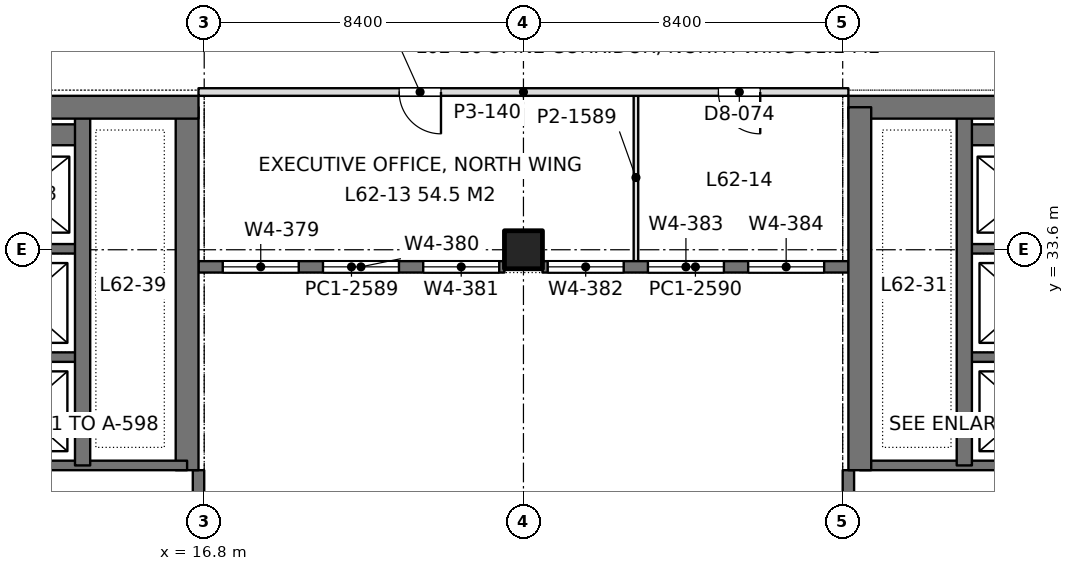
"""IFC4 building model, lengths in metres.
Left out: names, types, materials, properties, quantities, classifications, styles, units other than length and angle.
Written with IfcOpenShell. Run it as: python <this file> out.ifc"""

import sys

from ifc_helpers import new_model, si_unit, direction, frame, frame_2d, origin, origin_2d, place, context, subcontext, project, spatial, rectangle, extrude, element, fill, save


model = new_model("IFC4")
c1 = context("Model", 3, precision=1e-05, world=origin(), true_north=direction((0.0, 1.0)))
c2 = subcontext(c1, "Body", "Model", "MODEL_VIEW")
j1 = project(units=[si_unit("LENGTHUNIT", "METRE"), si_unit("PLANEANGLEUNIT", "RADIAN")], contexts=[c1])
p1 = place(None, origin())
s1 = spatial("IfcSite", under=j1, at=p1, CompositionType="ELEMENT")
p2 = place(p1, origin())
s2 = spatial("IfcBuilding", under=s1, at=p2, CompositionType="ELEMENT")
p3 = place(p2, frame((0.0, 0.0, 272.7)))
s3 = spatial("IfcBuildingStorey", under=s2, at=p3, CompositionType="ELEMENT", Elevation=272.7)
p4 = place(p3, frame((25.2, 33.6, 0.0), z_axis=(0.0, 0.0, 1.0), x_axis=(1.0, 0.0, 0.0)))
e1 = element("IfcColumn", 1, at=p4, inside=s3, PredefinedType="COLUMN", context=c2, shape_type="SweptSolid", body=[
    extrude(rectangle(XDim=1.0, YDim=1.0, at=origin_2d()), origin(), (0.0, 0.0, 1.0), 4.5),
])
p5 = place(p3, frame((-1.05, 37.35, 0.0), z_axis=(0.0, 0.0, 1.0), x_axis=(1.0, 0.0, 0.0)))
e2 = element("IfcWall", 2, at=p5, inside=s3, PredefinedType="SHEAR", context=c2, shape_type="SweptSolid", body=[
    extrude(rectangle(XDim=17.7, YDim=0.6, at=frame_2d((8.85, 0.0))), origin(), (0.0, 0.0, 1.0), 4.5),
])
p6 = place(p5, frame((8.8, 0.0, 0.0)))
e3 = element("IfcOpeningElement", 3, at=p6, cuts=e2, PredefinedType="OPENING", context=c2, shape_type="SweptSolid", body=[
    extrude(rectangle(XDim=1.8, YDim=2.4, at=frame_2d((0.9, 1.2))), frame((0.0, 0.31, 0.0), z_axis=(0.0, -1.0, 0.0), x_axis=(1.0, 0.0, 0.0)), (0.0, 0.0, 1.0), 0.62),
])
p7 = place(p3, frame((16.35, 27.8, 0.0), z_axis=(0.0, 0.0, 1.0), x_axis=(0.0, 1.0, 0.0)))
e4 = element("IfcWall", 4, at=p7, inside=s3, PredefinedType="SHEAR", context=c2, shape_type="SweptSolid", body=[
    extrude(rectangle(XDim=9.55, YDim=0.6, at=frame_2d((4.775, 0.0))), origin(), (0.0, 0.0, 1.0), 4.5),
])
p8 = place(p3, frame((13.6, 27.925, 0.0), z_axis=(0.0, 0.0, 1.0), x_axis=(0.0, 1.0, 0.0)))
e5 = element("IfcWall", 5, at=p8, inside=s3, PredefinedType="SHEAR", context=c2, shape_type="SweptSolid", body=[
    extrude(rectangle(XDim=9.425, YDim=0.4, at=frame_2d((4.712, 0.0))), origin(), (0.0, 0.0, 1.0), 4.5),
])
p9 = place(p3, frame((10.4, 27.925, 0.0), z_axis=(0.0, 0.0, 1.0), x_axis=(1.0, 0.0, 0.0)))
e6 = element("IfcWall", 6, at=p9, inside=s3, PredefinedType="SHEAR", context=c2, shape_type="SweptSolid", body=[
    extrude(rectangle(XDim=5.95, YDim=0.25, at=frame_2d((2.975, 0.0))), origin(), (0.0, 0.0, 1.0), 4.5),
])
for number, where, z_axis, x_axis in (
    (7, (10.4, 30.775, 0.0), (0.0, 0.0, 1.0), (1.0, 0.0, 0.0)),
    (8, (10.4, 33.625, 0.0), (0.0, 0.0, 1.0), (1.0, 0.0, 0.0)),
):
    element("IfcWall", number, at=place(p3, frame(where, z_axis=z_axis, x_axis=x_axis)), inside=s3, PredefinedType="SHEAR", context=c2, shape_type="SweptSolid", body=[
        extrude(rectangle(XDim=3.2, YDim=0.25, at=frame_2d((1.6, 0.0))), origin(), (0.0, 0.0, 1.0), 4.5),
    ])
p10 = place(p3, frame((10.4, 36.625, 0.0), z_axis=(0.0, 0.0, 1.0), x_axis=(1.0, 0.0, 0.0)))
e9 = element("IfcWall", 9, at=p10, inside=s3, PredefinedType="SHEAR", context=c2, shape_type="SweptSolid", body=[
    extrude(rectangle(XDim=3.2, YDim=0.55, at=frame_2d((1.6, 0.0))), origin(), (0.0, 0.0, 1.0), 4.5),
])
p11 = place(p3, frame((33.75, 37.35, 0.0), z_axis=(0.0, 0.0, 1.0), x_axis=(1.0, 0.0, 0.0)))
e10 = element("IfcWall", 10, at=p11, inside=s3, PredefinedType="SHEAR", context=c2, shape_type="SweptSolid", body=[
    extrude(rectangle(XDim=17.7, YDim=0.6, at=frame_2d((8.85, 0.0))), origin(), (0.0, 0.0, 1.0), 4.5),
])
p12 = place(p11, frame((7.1, 0.0, 0.0)))
e11 = element("IfcOpeningElement", 11, at=p12, cuts=e10, PredefinedType="OPENING", context=c2, shape_type="SweptSolid", body=[
    extrude(rectangle(XDim=1.8, YDim=2.4, at=frame_2d((0.9, 1.2))), frame((0.0, 0.31, 0.0), z_axis=(0.0, -1.0, 0.0), x_axis=(1.0, 0.0, 0.0)), (0.0, 0.0, 1.0), 0.62),
])
p13 = place(p3, frame((34.05, 27.8, 0.0), z_axis=(0.0, 0.0, 1.0), x_axis=(0.0, 1.0, 0.0)))
e12 = element("IfcWall", 12, at=p13, inside=s3, PredefinedType="SHEAR", context=c2, shape_type="SweptSolid", body=[
    extrude(rectangle(XDim=9.55, YDim=0.6, at=frame_2d((4.775, 0.0))), origin(), (0.0, 0.0, 1.0), 4.5),
])
p14 = place(p3, frame((36.8, 27.925, 0.0), z_axis=(0.0, 0.0, 1.0), x_axis=(0.0, 1.0, 0.0)))
e13 = element("IfcWall", 13, at=p14, inside=s3, PredefinedType="SHEAR", context=c2, shape_type="SweptSolid", body=[
    extrude(rectangle(XDim=9.425, YDim=0.4, at=frame_2d((4.712, 0.0))), origin(), (0.0, 0.0, 1.0), 4.5),
])
p15 = place(p3, frame((40.0, 27.925, 0.0), z_axis=(0.0, 0.0, 1.0), x_axis=(-1.0, 0.0, 0.0)))
e14 = element("IfcWall", 14, at=p15, inside=s3, PredefinedType="SHEAR", context=c2, shape_type="SweptSolid", body=[
    extrude(rectangle(XDim=5.95, YDim=0.25, at=frame_2d((2.975, 0.0))), origin(), (0.0, 0.0, 1.0), 4.5),
])
for number, where, z_axis, x_axis in (
    (15, (40.0, 30.775, 0.0), (0.0, 0.0, 1.0), (-1.0, 0.0, 0.0)),
    (16, (40.0, 33.625, 0.0), (0.0, 0.0, 1.0), (-1.0, 0.0, 0.0)),
):
    element("IfcWall", number, at=place(p3, frame(where, z_axis=z_axis, x_axis=x_axis)), inside=s3, PredefinedType="SHEAR", context=c2, shape_type="SweptSolid", body=[
        extrude(rectangle(XDim=3.2, YDim=0.25, at=frame_2d((1.6, 0.0))), origin(), (0.0, 0.0, 1.0), 4.5),
    ])
p16 = place(p3, frame((40.0, 36.625, 0.0), z_axis=(0.0, 0.0, 1.0), x_axis=(-1.0, 0.0, 0.0)))
e17 = element("IfcWall", 17, at=p16, inside=s3, PredefinedType="SHEAR", context=c2, shape_type="SweptSolid", body=[
    extrude(rectangle(XDim=3.2, YDim=0.55, at=frame_2d((1.6, 0.0))), origin(), (0.0, 0.0, 1.0), 4.5),
])
p17 = place(p3, frame((16.65, 17.1, 0.0), z_axis=(0.0, 0.0, 1.0), x_axis=(0.0, 1.0, 0.0)))
e18 = element("IfcWall", 18, at=p17, inside=s3, PredefinedType="SOLIDWALL", context=c2, shape_type="SweptSolid", body=[
    extrude(rectangle(XDim=10.7, YDim=0.3, at=frame_2d((5.35, 0.0))), origin(), (0.0, 0.0, 1.0), 4.35),
])
p18 = place(p17, frame((0.55, 0.0, 0.9)))
e19 = element("IfcOpeningElement", 19, at=p18, cuts=e18, PredefinedType="OPENING", context=c2, shape_type="SweptSolid", body=[
    extrude(rectangle(XDim=2.0, YDim=1.9, at=frame_2d((1.0, 0.95))), frame((0.0, 0.16, 0.0), z_axis=(0.0, -1.0, 0.0), x_axis=(1.0, 0.0, 0.0)), (0.0, 0.0, 1.0), 0.32),
])
p19 = place(p17, frame((2.9, 0.0, 0.9)))
e20 = element("IfcOpeningElement", 20, at=p19, cuts=e18, PredefinedType="OPENING", context=c2, shape_type="SweptSolid", body=[
    extrude(rectangle(XDim=2.0, YDim=1.9, at=frame_2d((1.0, 0.95))), frame((0.0, 0.16, 0.0), z_axis=(0.0, -1.0, 0.0), x_axis=(1.0, 0.0, 0.0)), (0.0, 0.0, 1.0), 0.32),
])
p20 = place(p17, frame((7.675, 0.0, 0.9)))
e21 = element("IfcOpeningElement", 21, at=p20, cuts=e18, PredefinedType="OPENING", context=c2, shape_type="SweptSolid", body=[
    extrude(rectangle(XDim=2.0, YDim=1.9, at=frame_2d((1.0, 0.95))), frame((0.0, 0.16, 0.0), z_axis=(0.0, -1.0, 0.0), x_axis=(1.0, 0.0, 0.0)), (0.0, 0.0, 1.0), 0.32),
])
p21 = place(p3, frame((33.75, 17.1, 0.0), z_axis=(0.0, 0.0, 1.0), x_axis=(0.0, 1.0, 0.0)))
e22 = element("IfcWall", 22, at=p21, inside=s3, PredefinedType="SOLIDWALL", context=c2, shape_type="SweptSolid", body=[
    extrude(rectangle(XDim=10.7, YDim=0.3, at=frame_2d((5.35, 0.0))), origin(), (0.0, 0.0, 1.0), 4.35),
])
p22 = place(p21, frame((0.55, 0.0, 0.9)))
e23 = element("IfcOpeningElement", 23, at=p22, cuts=e22, PredefinedType="OPENING", context=c2, shape_type="SweptSolid", body=[
    extrude(rectangle(XDim=2.0, YDim=1.9, at=frame_2d((1.0, 0.95))), frame((0.0, 0.16, 0.0), z_axis=(0.0, -1.0, 0.0), x_axis=(1.0, 0.0, 0.0)), (0.0, 0.0, 1.0), 0.32),
])
p23 = place(p21, frame((2.9, 0.0, 0.9)))
e24 = element("IfcOpeningElement", 24, at=p23, cuts=e22, PredefinedType="OPENING", context=c2, shape_type="SweptSolid", body=[
    extrude(rectangle(XDim=2.0, YDim=1.9, at=frame_2d((1.0, 0.95))), frame((0.0, 0.16, 0.0), z_axis=(0.0, -1.0, 0.0), x_axis=(1.0, 0.0, 0.0)), (0.0, 0.0, 1.0), 0.32),
])
p24 = place(p21, frame((7.675, 0.0, 0.9)))
e25 = element("IfcOpeningElement", 25, at=p24, cuts=e22, PredefinedType="OPENING", context=c2, shape_type="SweptSolid", body=[
    extrude(rectangle(XDim=2.0, YDim=1.9, at=frame_2d((1.0, 0.95))), frame((0.0, 0.16, 0.0), z_axis=(0.0, -1.0, 0.0), x_axis=(1.0, 0.0, 0.0)), (0.0, 0.0, 1.0), 0.32),
])
p25 = place(p3, frame((16.65, 33.15, 0.0), z_axis=(0.0, 0.0, 1.0), x_axis=(1.0, 0.0, 0.0)))
e26 = element("IfcWall", 26, at=p25, inside=s3, PredefinedType="SOLIDWALL", context=c2, shape_type="SweptSolid", body=[
    extrude(rectangle(XDim=8.05, YDim=0.3, at=frame_2d((4.025, 0.0))), origin(), (0.0, 0.0, 1.0), 4.35),
])
p26 = place(p25, frame((0.637, 0.0, 0.9)))
e27 = element("IfcOpeningElement", 27, at=p26, cuts=e26, PredefinedType="OPENING", context=c2, shape_type="SweptSolid", body=[
    extrude(rectangle(XDim=2.0, YDim=1.9, at=frame_2d((1.0, 0.95))), frame((0.0, 0.16, 0.0), z_axis=(0.0, -1.0, 0.0), x_axis=(1.0, 0.0, 0.0)), (0.0, 0.0, 1.0), 0.32),
])
p27 = place(p25, frame((3.275, 0.0, 0.9)))
e28 = element("IfcOpeningElement", 28, at=p27, cuts=e26, PredefinedType="OPENING", context=c2, shape_type="SweptSolid", body=[
    extrude(rectangle(XDim=2.0, YDim=1.9, at=frame_2d((1.0, 0.95))), frame((0.0, 0.16, 0.0), z_axis=(0.0, -1.0, 0.0), x_axis=(1.0, 0.0, 0.0)), (0.0, 0.0, 1.0), 0.32),
])
p28 = place(p25, frame((5.913, 0.0, 0.9)))
e29 = element("IfcOpeningElement", 29, at=p28, cuts=e26, PredefinedType="OPENING", context=c2, shape_type="SweptSolid", body=[
    extrude(rectangle(XDim=2.0, YDim=1.9, at=frame_2d((1.0, 0.95))), frame((0.0, 0.16, 0.0), z_axis=(0.0, -1.0, 0.0), x_axis=(1.0, 0.0, 0.0)), (0.0, 0.0, 1.0), 0.32),
])
p29 = place(p3, frame((25.7, 33.15, 0.0), z_axis=(0.0, 0.0, 1.0), x_axis=(1.0, 0.0, 0.0)))
e30 = element("IfcWall", 30, at=p29, inside=s3, PredefinedType="SOLIDWALL", context=c2, shape_type="SweptSolid", body=[
    extrude(rectangle(XDim=8.05, YDim=0.3, at=frame_2d((4.025, 0.0))), origin(), (0.0, 0.0, 1.0), 4.35),
])
p30 = place(p29, frame((0.137, 0.0, 0.9)))
e31 = element("IfcOpeningElement", 31, at=p30, cuts=e30, PredefinedType="OPENING", context=c2, shape_type="SweptSolid", body=[
    extrude(rectangle(XDim=2.0, YDim=1.9, at=frame_2d((1.0, 0.95))), frame((0.0, 0.16, 0.0), z_axis=(0.0, -1.0, 0.0), x_axis=(1.0, 0.0, 0.0)), (0.0, 0.0, 1.0), 0.32),
])
p31 = place(p29, frame((2.775, 0.0, 0.9)))
e32 = element("IfcOpeningElement", 32, at=p31, cuts=e30, PredefinedType="OPENING", context=c2, shape_type="SweptSolid", body=[
    extrude(rectangle(XDim=2.0, YDim=1.9, at=frame_2d((1.0, 0.95))), frame((0.0, 0.16, 0.0), z_axis=(0.0, -1.0, 0.0), x_axis=(1.0, 0.0, 0.0)), (0.0, 0.0, 1.0), 0.32),
])
p32 = place(p29, frame((5.413, 0.0, 0.9)))
e33 = element("IfcOpeningElement", 33, at=p32, cuts=e30, PredefinedType="OPENING", context=c2, shape_type="SweptSolid", body=[
    extrude(rectangle(XDim=2.0, YDim=1.9, at=frame_2d((1.0, 0.95))), frame((0.0, 0.16, 0.0), z_axis=(0.0, -1.0, 0.0), x_axis=(1.0, 0.0, 0.0)), (0.0, 0.0, 1.0), 0.32),
])
p33 = place(p3, frame((28.16, 33.298, 0.0), z_axis=(0.0, 0.0, 1.0), x_axis=(0.0, 1.0, 0.0)))
e34 = element("IfcWall", 34, at=p33, inside=s3, PredefinedType="PARTITIONING", context=c2, shape_type="SweptSolid", body=[
    extrude(rectangle(XDim=4.404, YDim=0.12, at=frame_2d((2.202, 0.0))), origin(), (0.0, 0.0, 1.0), 3.66),
])
p34 = place(p3, frame((16.65, 37.75, 0.0), z_axis=(0.0, 0.0, 1.0), x_axis=(1.0, 0.0, 0.0)))
e35 = element("IfcWall", 35, at=p34, inside=s3, PredefinedType="PARTITIONING", context=c2, shape_type="SweptSolid", body=[
    extrude(rectangle(XDim=17.1, YDim=0.2, at=frame_2d((8.55, 0.0))), origin(), (0.0, 0.0, 1.0), 3.8),
])
p35 = place(p34, frame((5.28, 0.0, 0.0)))
e36 = element("IfcOpeningElement", 36, at=p35, cuts=e35, PredefinedType="OPENING", context=c2, shape_type="SweptSolid", body=[
    extrude(rectangle(XDim=1.1, YDim=2.4, at=frame_2d((0.55, 1.2))), frame((0.0, 0.11, 0.0), z_axis=(0.0, -1.0, 0.0), x_axis=(1.0, 0.0, 0.0)), (0.0, 0.0, 1.0), 0.22),
])
p36 = place(p34, frame((13.68, 0.0, 0.0)))
e37 = element("IfcOpeningElement", 37, at=p36, cuts=e35, PredefinedType="OPENING", context=c2, shape_type="SweptSolid", body=[
    extrude(rectangle(XDim=1.1, YDim=2.4, at=frame_2d((0.55, 1.2))), frame((0.0, 0.11, 0.0), z_axis=(0.0, -1.0, 0.0), x_axis=(1.0, 0.0, 0.0)), (0.0, 0.0, 1.0), 0.22),
])
p37 = place(p26, origin())
e38 = element("IfcWindow", 38, at=p37, inside=s3, PartitioningType="SINGLE_PANEL", PredefinedType="WINDOW", context=c2, shape_type="SweptSolid", body=[
    extrude(rectangle(XDim=2.0, YDim=1.9, at=frame_2d((1.0, 0.95))), frame((0.0, 0.03, 0.0), z_axis=(0.0, -1.0, 0.0), x_axis=(1.0, 0.0, 0.0)), (0.0, 0.0, 1.0), 0.06),
])
fill(e27, e38)
p38 = place(p27, origin())
e39 = element("IfcWindow", 39, at=p38, inside=s3, PartitioningType="SINGLE_PANEL", PredefinedType="WINDOW", context=c2, shape_type="SweptSolid", body=[
    extrude(rectangle(XDim=2.0, YDim=1.9, at=frame_2d((1.0, 0.95))), frame((0.0, 0.03, 0.0), z_axis=(0.0, -1.0, 0.0), x_axis=(1.0, 0.0, 0.0)), (0.0, 0.0, 1.0), 0.06),
])
fill(e28, e39)
p39 = place(p28, origin())
e40 = element("IfcWindow", 40, at=p39, inside=s3, PartitioningType="SINGLE_PANEL", PredefinedType="WINDOW", context=c2, shape_type="SweptSolid", body=[
    extrude(rectangle(XDim=2.0, YDim=1.9, at=frame_2d((1.0, 0.95))), frame((0.0, 0.03, 0.0), z_axis=(0.0, -1.0, 0.0), x_axis=(1.0, 0.0, 0.0)), (0.0, 0.0, 1.0), 0.06),
])
fill(e29, e40)
p40 = place(p30, origin())
e41 = element("IfcWindow", 41, at=p40, inside=s3, PartitioningType="SINGLE_PANEL", PredefinedType="WINDOW", context=c2, shape_type="SweptSolid", body=[
    extrude(rectangle(XDim=2.0, YDim=1.9, at=frame_2d((1.0, 0.95))), frame((0.0, 0.03, 0.0), z_axis=(0.0, -1.0, 0.0), x_axis=(1.0, 0.0, 0.0)), (0.0, 0.0, 1.0), 0.06),
])
fill(e31, e41)
p41 = place(p31, origin())
e42 = element("IfcWindow", 42, at=p41, inside=s3, PartitioningType="SINGLE_PANEL", PredefinedType="WINDOW", context=c2, shape_type="SweptSolid", body=[
    extrude(rectangle(XDim=2.0, YDim=1.9, at=frame_2d((1.0, 0.95))), frame((0.0, 0.03, 0.0), z_axis=(0.0, -1.0, 0.0), x_axis=(1.0, 0.0, 0.0)), (0.0, 0.0, 1.0), 0.06),
])
fill(e32, e42)
p42 = place(p32, origin())
e43 = element("IfcWindow", 43, at=p42, inside=s3, PartitioningType="SINGLE_PANEL", PredefinedType="WINDOW", context=c2, shape_type="SweptSolid", body=[
    extrude(rectangle(XDim=2.0, YDim=1.9, at=frame_2d((1.0, 0.95))), frame((0.0, 0.03, 0.0), z_axis=(0.0, -1.0, 0.0), x_axis=(1.0, 0.0, 0.0)), (0.0, 0.0, 1.0), 0.06),
])
fill(e33, e43)
p43 = place(p35, frame((1.1, 0.0, 0.0), z_axis=(0.0, 0.0, 1.0), x_axis=(-1.0, 0.0, 0.0)))
e44 = element("IfcDoor", 44, at=p43, inside=s3, OperationType="SINGLE_SWING_LEFT", PredefinedType="DOOR", context=c2, shape_type="SweptSolid", body=[
    extrude(rectangle(XDim=1.1, YDim=2.4, at=frame_2d((0.55, 1.2))), frame((0.0, 0.025, 0.0), z_axis=(0.0, -1.0, 0.0), x_axis=(1.0, 0.0, 0.0)), (0.0, 0.0, 1.0), 0.05),
])
fill(e36, e44)
p44 = place(p36, frame((1.1, 0.0, 0.0), z_axis=(0.0, 0.0, 1.0), x_axis=(-1.0, 0.0, 0.0)))
e45 = element("IfcDoor", 45, at=p44, inside=s3, OperationType="SINGLE_SWING_LEFT", PredefinedType="DOOR", context=c2, shape_type="SweptSolid", body=[
    extrude(rectangle(XDim=1.1, YDim=2.4, at=frame_2d((0.55, 1.2))), frame((0.0, 0.025, 0.0), z_axis=(0.0, -1.0, 0.0), x_axis=(1.0, 0.0, 0.0)), (0.0, 0.0, 1.0), 0.05),
])
fill(e37, e45)
save(model, sys.argv[1])
